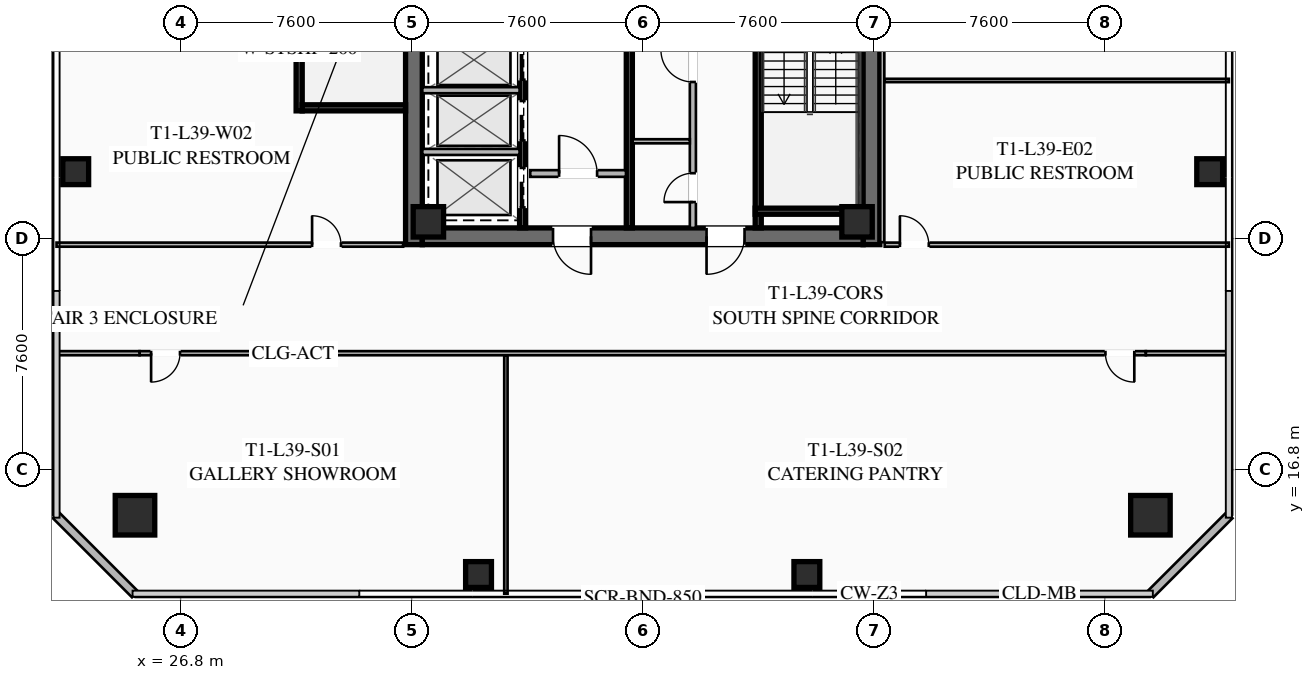
"""IFC4 building model, lengths in metres.
Left out: names, types, materials, properties, quantities, classifications, styles, units other than length and angle.
Written with IfcOpenShell. Run it as: python <this file> out.ifc"""

import sys

from ifc_helpers import new_model, si_unit, direction, frame, frame_2d, origin, origin_2d, place, context, subcontext, project, spatial, rectangle, hollow_rectangle, extrude, element, fill, save


model = new_model("IFC4")
c1 = context("Model", 3, precision=1e-05, world=origin(), true_north=direction((0.0, 1.0)))
c2 = subcontext(c1, "Body", "Model", "MODEL_VIEW")
j1 = project(units=[si_unit("LENGTHUNIT", "METRE"), si_unit("PLANEANGLEUNIT", "RADIAN")], contexts=[c1])
p1 = place(None, origin())
s1 = spatial("IfcSite", under=j1, at=p1, CompositionType="ELEMENT")
p2 = place(p1, origin())
s2 = spatial("IfcBuilding", under=s1, at=p2, CompositionType="ELEMENT")
p3 = place(p2, frame((0.0, 0.0, 146.35)))
s3 = spatial("IfcBuildingStorey", under=s2, at=p3, CompositionType="ELEMENT", Elevation=146.35)
for number, where, z_axis, x_axis in (
    (1, (34.475, 24.2, 0.0), (0.0, 0.0, 1.0), (0.0, 1.0, 0.0)),
    (2, (49.525, 39.8, 0.0), (0.0, 0.0, 1.0), (0.0, -1.0, 0.0)),
):
    element("IfcWall", number, at=place(p3, frame(where, z_axis=z_axis, x_axis=x_axis)), inside=s3, PredefinedType="SHEAR", context=c2, shape_type="SweptSolid", body=[
        extrude(rectangle(XDim=15.6, YDim=0.55, at=frame_2d((7.8, 0.0))), origin(), (0.0, 0.0, 1.0), 3.55),
    ])
p4 = place(p3, frame((49.25, 24.475, 0.0), z_axis=(0.0, 0.0, 1.0), x_axis=(-1.0, 0.0, 0.0)))
e3 = element("IfcWall", 3, at=p4, inside=s3, PredefinedType="SHEAR", context=c2, shape_type="SweptSolid", body=[
    extrude(rectangle(XDim=14.5, YDim=0.55, at=frame_2d((7.25, 0.0))), origin(), (0.0, 0.0, 1.0), 3.55),
])
p5 = place(p4, frame((8.95, 0.0, 0.0)))
e4 = element("IfcOpeningElement", 4, at=p5, cuts=e3, PredefinedType="OPENING", context=c2, shape_type="SweptSolid", body=[
    extrude(rectangle(XDim=1.25, YDim=2.25, at=frame_2d((0.625, 1.125))), frame((0.0, 0.285, 0.0), z_axis=(0.0, -1.0, 0.0), x_axis=(1.0, 0.0, 0.0)), (0.0, 0.0, 1.0), 0.57),
])
p6 = place(p4, frame((3.9, 0.0, 0.0)))
e5 = element("IfcOpeningElement", 5, at=p6, cuts=e3, PredefinedType="OPENING", context=c2, shape_type="SweptSolid", body=[
    extrude(rectangle(XDim=1.25, YDim=2.25, at=frame_2d((0.625, 1.125))), frame((0.0, 0.285, 0.0), z_axis=(0.0, -1.0, 0.0), x_axis=(1.0, 0.0, 0.0)), (0.0, 0.0, 1.0), 0.57),
])
for number, where, z_axis, x_axis in (
    (6, (34.95, 24.95, 0.0), (0.0, 0.0, 1.0), (1.0, 0.0, 0.0)),
    (7, (49.05, 24.95, 0.0), (0.0, 0.0, 1.0), (1.0, 0.0, 0.0)),
):
    element("IfcColumn", number, at=place(p3, frame(where, z_axis=z_axis, x_axis=x_axis)), inside=s3, PredefinedType="COLUMN", context=c2, shape_type="SweptSolid", body=[
        extrude(hollow_rectangle(XDim=1.0, YDim=1.0, WallThickness=0.04, at=origin_2d()), origin(), (0.0, 0.0, 1.0), 3.37),
    ])
for number, where, z_axis, x_axis in (
    (8, (25.3, 15.3, 0.0), (0.0, 0.0, 1.0), (1.0, 0.0, 0.0)),
    (9, (58.7, 15.3, 0.0), (0.0, 0.0, 1.0), (1.0, 0.0, 0.0)),
):
    element("IfcColumn", number, at=place(p3, frame(where, z_axis=z_axis, x_axis=x_axis)), inside=s3, PredefinedType="COLUMN", context=c2, shape_type="SweptSolid", body=[
        extrude(hollow_rectangle(XDim=1.3, YDim=1.3, WallThickness=0.05, at=origin_2d()), origin(), (0.0, 0.0, 1.0), 3.37),
    ])
for number, where, z_axis, x_axis in (
    (10, (36.6, 13.35, 0.0), (0.0, 0.0, 1.0), (1.0, 0.0, 0.0)),
    (11, (47.4, 13.35, 0.0), (0.0, 0.0, 1.0), (1.0, 0.0, 0.0)),
    (12, (60.65, 26.6, 0.0), (0.0, 0.0, 1.0), (1.0, 0.0, 0.0)),
    (13, (23.35, 26.6, 0.0), (0.0, 0.0, 1.0), (1.0, 0.0, 0.0)),
):
    element("IfcColumn", number, at=place(p3, frame(where, z_axis=z_axis, x_axis=x_axis)), inside=s3, PredefinedType="COLUMN", context=c2, shape_type="SweptSolid", body=[
        extrude(hollow_rectangle(XDim=0.85, YDim=0.85, WallThickness=0.035, at=origin_2d()), origin(), (0.0, 0.0, 1.0), 3.37),
    ])
for number, where, z_axis, x_axis in (
    (14, (25.3, 12.7, 0.0), (0.0, 0.0, 1.0), (-0.707, 0.707, 0.0)),
    (15, (61.3, 15.3, 0.0), (0.0, 0.0, 1.0), (-0.707, -0.707, 0.0)),
):
    element("IfcWall", number, at=place(p3, frame(where, z_axis=z_axis, x_axis=x_axis)), inside=s3, PredefinedType="SOLIDWALL", context=c2, shape_type="SweptSolid", body=[
        extrude(rectangle(XDim=3.677, YDim=0.28, at=frame_2d((1.838, 0.0))), origin(), (0.0, 0.0, 1.0), 3.37),
    ])
p7 = place(p3, frame((45.8, 32.8, 0.0), z_axis=(0.0, 0.0, 1.0), x_axis=(0.0, -1.0, 0.0)))
e16 = element("IfcWall", 16, at=p7, inside=s3, PredefinedType="SHEAR", context=c2, shape_type="SweptSolid", body=[
    extrude(rectangle(XDim=8.05, YDim=0.2, at=frame_2d((4.025, 0.0))), origin(), (0.0, 0.0, 1.0), 3.37),
])
p8 = place(p7, frame((0.45, 0.0, 0.0)))
e17 = element("IfcOpeningElement", 17, at=p8, cuts=e16, PredefinedType="OPENING", context=c2, shape_type="SweptSolid", body=[
    extrude(rectangle(XDim=1.15, YDim=2.2, at=frame_2d((0.575, 1.1))), frame((0.0, 0.11, 0.0), z_axis=(0.0, -1.0, 0.0), x_axis=(1.0, 0.0, 0.0)), (0.0, 0.0, 1.0), 0.22),
])
p9 = place(p3, frame((45.7, 25.3, 0.0), z_axis=(0.0, 0.0, 1.0), x_axis=(1.0, 0.0, 0.0)))
e18 = element("IfcWall", 18, at=p9, inside=s3, PredefinedType="SHEAR", context=c2, shape_type="SweptSolid", body=[
    extrude(rectangle(XDim=3.55, YDim=0.2, at=frame_2d((1.775, 0.0))), origin(), (0.0, 0.0, 1.0), 3.37),
])
p10 = place(p3, frame((41.56, 24.75, 0.0), z_axis=(0.0, 0.0, 1.0), x_axis=(0.0, 1.0, 0.0)))
e19 = element("IfcWall", 19, at=p10, inside=s3, PredefinedType="SHEAR", context=c2, shape_type="SweptSolid", body=[
    extrude(rectangle(XDim=14.5, YDim=0.2, at=frame_2d((7.25, 0.0))), origin(), (0.0, 0.0, 1.0), 3.37),
])
p11 = place(p3, frame((38.3, 26.54, 0.0), z_axis=(0.0, 0.0, 1.0), x_axis=(1.0, 0.0, 0.0)))
e20 = element("IfcWall", 20, at=p11, inside=s3, PredefinedType="SOLIDWALL", context=c2, shape_type="SweptSolid", body=[
    extrude(rectangle(XDim=3.15, YDim=0.22, at=frame_2d((1.575, 0.0))), origin(), (0.0, 0.0, 1.0), 2.723),
])
p12 = place(p11, frame((0.95, 0.0, 0.0)))
e21 = element("IfcOpeningElement", 21, at=p12, cuts=e20, PredefinedType="OPENING", context=c2, shape_type="SweptSolid", body=[
    extrude(rectangle(XDim=1.25, YDim=2.25, at=frame_2d((0.625, 1.125))), frame((0.0, 0.12, 0.0), z_axis=(0.0, -1.0, 0.0), x_axis=(1.0, 0.0, 0.0)), (0.0, 0.0, 1.0), 0.24),
])
p13 = place(p3, frame((38.05, 24.75, 0.0), z_axis=(0.0, 0.0, 1.0), x_axis=(0.0, 1.0, 0.0)))
e22 = element("IfcWall", 22, at=p13, inside=s3, PredefinedType="SHEAR", context=c2, shape_type="SweptSolid", body=[
    extrude(rectangle(XDim=6.45, YDim=0.2, at=frame_2d((3.225, 0.0))), origin(), (0.0, 0.0, 1.0), 3.37),
])
p14 = place(p13, frame((4.875, 0.0, 0.0)))
e23 = element("IfcOpeningElement", 23, at=p14, cuts=e22, PredefinedType="OPENING", context=c2, shape_type="SweptSolid", body=[
    extrude(rectangle(XDim=1.3, YDim=2.25, at=frame_2d((0.65, 1.125))), frame((0.0, 0.11, 0.0), z_axis=(0.0, -1.0, 0.0), x_axis=(1.0, 0.0, 0.0)), (0.0, 0.0, 1.0), 0.22),
])
p15 = place(p13, frame((2.875, 0.0, 0.0)))
e24 = element("IfcOpeningElement", 24, at=p15, cuts=e22, PredefinedType="OPENING", context=c2, shape_type="SweptSolid", body=[
    extrude(rectangle(XDim=1.3, YDim=2.25, at=frame_2d((0.65, 1.125))), frame((0.0, 0.11, 0.0), z_axis=(0.0, -1.0, 0.0), x_axis=(1.0, 0.0, 0.0)), (0.0, 0.0, 1.0), 0.22),
])
p16 = place(p13, frame((0.675, 0.0, 0.0)))
e25 = element("IfcOpeningElement", 25, at=p16, cuts=e22, PredefinedType="OPENING", context=c2, shape_type="SweptSolid", body=[
    extrude(rectangle(XDim=1.3, YDim=2.25, at=frame_2d((0.65, 1.125))), frame((0.0, 0.11, 0.0), z_axis=(0.0, -1.0, 0.0), x_axis=(1.0, 0.0, 0.0)), (0.0, 0.0, 1.0), 0.22),
])
for number, where, z_axis, x_axis in (
    (26, (34.75, 27.25, 0.0), (0.0, 0.0, 1.0), (1.0, 0.0, 0.0)),
    (27, (34.75, 29.28, 0.0), (0.0, 0.0, 1.0), (1.0, 0.0, 0.0)),
):
    element("IfcWall", number, at=place(p3, frame(where, z_axis=z_axis, x_axis=x_axis)), inside=s3, PredefinedType="SOLIDWALL", context=c2, shape_type="SweptSolid", body=[
        extrude(rectangle(XDim=3.2, YDim=0.2, at=frame_2d((1.6, 0.0))), origin(), (0.0, 0.0, 1.0), 3.37),
    ])
p17 = place(p3, frame((43.65, 24.75, 0.0), z_axis=(0.0, 0.0, 1.0), x_axis=(0.0, 1.0, 0.0)))
e28 = element("IfcWall", 28, at=p17, inside=s3, PredefinedType="SOLIDWALL", context=c2, shape_type="SweptSolid", body=[
    extrude(rectangle(XDim=6.9, YDim=0.2, at=frame_2d((3.45, 0.0))), origin(), (0.0, 0.0, 1.0), 2.723),
])
p18 = place(p17, frame((0.85, 0.0, 0.0)))
e29 = element("IfcOpeningElement", 29, at=p18, cuts=e28, PredefinedType="OPENING", context=c2, shape_type="SweptSolid", body=[
    extrude(rectangle(XDim=0.95, YDim=2.05, at=frame_2d((0.475, 1.025))), frame((0.0, 0.11, 0.0), z_axis=(0.0, -1.0, 0.0), x_axis=(1.0, 0.0, 0.0)), (0.0, 0.0, 1.0), 0.22),
])
p19 = place(p17, frame((4.8, 0.0, 0.0)))
e30 = element("IfcOpeningElement", 30, at=p19, cuts=e28, PredefinedType="OPENING", context=c2, shape_type="SweptSolid", body=[
    extrude(rectangle(XDim=1.05, YDim=2.2, at=frame_2d((0.525, 1.1))), frame((0.0, 0.11, 0.0), z_axis=(0.0, -1.0, 0.0), x_axis=(1.0, 0.0, 0.0)), (0.0, 0.0, 1.0), 0.22),
])
p20 = place(p3, frame((41.67, 27.6, 0.0), z_axis=(0.0, 0.0, 1.0), x_axis=(1.0, 0.0, 0.0)))
e31 = element("IfcWall", 31, at=p20, inside=s3, PredefinedType="PARTITIONING", context=c2, shape_type="SweptSolid", body=[
    extrude(rectangle(XDim=1.88, YDim=0.135, at=frame_2d((0.94, 0.0))), origin(), (0.0, 0.0, 1.0), 2.723),
])
p21 = place(p3, frame((30.7, 28.6, 0.0), z_axis=(0.0, 0.0, 1.0), x_axis=(0.0, 1.0, 0.0)))
e32 = element("IfcWall", 32, at=p21, inside=s3, PredefinedType="SHEAR", context=c2, shape_type="SweptSolid", body=[
    extrude(rectangle(XDim=6.8, YDim=0.2, at=frame_2d((3.4, 0.0))), origin(), (0.0, 0.0, 1.0), 3.37),
])
p22 = place(p3, frame((30.8, 28.7, 0.0), z_axis=(0.0, 0.0, 1.0), x_axis=(1.0, 0.0, 0.0)))
e33 = element("IfcWall", 33, at=p22, inside=s3, PredefinedType="SHEAR", context=c2, shape_type="SweptSolid", body=[
    extrude(rectangle(XDim=3.4, YDim=0.2, at=frame_2d((1.7, 0.0))), origin(), (0.0, 0.0, 1.0), 3.37),
])
p23 = place(p3, frame((58.55, 20.63, 0.0), z_axis=(0.0, 0.0, 1.0), x_axis=(-1.0, 0.0, 0.0)))
e34 = element("IfcWall", 34, at=p23, inside=s3, PredefinedType="PARTITIONING", context=c2, shape_type="SweptSolid", body=[
    extrude(rectangle(XDim=33.1, YDim=0.135, at=frame_2d((16.55, 0.0))), origin(), (0.0, 0.0, 1.0), 2.723),
])
p24 = place(p23, frame((31.77, 0.0, 0.0)))
e35 = element("IfcOpeningElement", 35, at=p24, cuts=e34, PredefinedType="OPENING", context=c2, shape_type="SweptSolid", body=[
    extrude(rectangle(XDim=0.95, YDim=2.05, at=frame_2d((0.475, 1.025))), frame((0.0, 0.077, 0.0), z_axis=(0.0, -1.0, 0.0), x_axis=(1.0, 0.0, 0.0)), (0.0, 0.0, 1.0), 0.155),
])
p25 = place(p23, frame((0.38, 0.0, 0.0)))
e36 = element("IfcOpeningElement", 36, at=p25, cuts=e34, PredefinedType="OPENING", context=c2, shape_type="SweptSolid", body=[
    extrude(rectangle(XDim=0.95, YDim=2.05, at=frame_2d((0.475, 1.025))), frame((0.0, 0.077, 0.0), z_axis=(0.0, -1.0, 0.0), x_axis=(1.0, 0.0, 0.0)), (0.0, 0.0, 1.0), 0.155),
])
for number, where, z_axis, x_axis in (
    (37, (22.72, 20.63, 0.0), (0.0, 0.0, 1.0), (1.0, 0.0, 0.0)),
    (38, (58.55, 20.63, 0.0), (0.0, 0.0, 1.0), (1.0, 0.0, 0.0)),
):
    element("IfcWall", number, at=place(p3, frame(where, z_axis=z_axis, x_axis=x_axis)), inside=s3, PredefinedType="PARTITIONING", context=c2, shape_type="SweptSolid", body=[
        extrude(rectangle(XDim=2.73, YDim=0.135, at=frame_2d((1.365, 0.0))), origin(), (0.0, 0.0, 1.0), 2.723),
    ])
p26 = place(p3, frame((37.5, 12.72, 0.0), z_axis=(0.0, 0.0, 1.0), x_axis=(0.0, 1.0, 0.0)))
e39 = element("IfcWall", 39, at=p26, inside=s3, PredefinedType="PARTITIONING", context=c2, shape_type="SweptSolid", body=[
    extrude(rectangle(XDim=7.83, YDim=0.11, at=frame_2d((3.915, 0.0))), origin(), (0.0, 0.0, 1.0), 2.723),
])
p27 = place(p3, frame((49.88, 39.72, 0.0), z_axis=(0.0, 0.0, 1.0), x_axis=(0.0, -1.0, 0.0)))
e40 = element("IfcWall", 40, at=p27, inside=s3, PredefinedType="PARTITIONING", context=c2, shape_type="SweptSolid", body=[
    extrude(rectangle(XDim=15.44, YDim=0.135, at=frame_2d((7.72, 0.0))), origin(), (0.0, 0.0, 1.0), 2.723),
])
p28 = place(p3, frame((49.96, 24.2, 0.0), z_axis=(0.0, 0.0, 1.0), x_axis=(1.0, 0.0, 0.0)))
e41 = element("IfcWall", 41, at=p28, inside=s3, PredefinedType="PARTITIONING", context=c2, shape_type="SweptSolid", body=[
    extrude(rectangle(XDim=11.32, YDim=0.135, at=frame_2d((5.66, 0.0))), origin(), (0.0, 0.0, 1.0), 2.723),
])
p29 = place(p28, frame((0.5, 0.0, 0.0)))
e42 = element("IfcOpeningElement", 42, at=p29, cuts=e41, PredefinedType="OPENING", context=c2, shape_type="SweptSolid", body=[
    extrude(rectangle(XDim=0.95, YDim=2.05, at=frame_2d((0.475, 1.025))), frame((0.0, 0.077, 0.0), z_axis=(0.0, -1.0, 0.0), x_axis=(1.0, 0.0, 0.0)), (0.0, 0.0, 1.0), 0.155),
])
p30 = place(p3, frame((49.96, 29.6, 0.0), z_axis=(0.0, 0.0, 1.0), x_axis=(1.0, 0.0, 0.0)))
e43 = element("IfcWall", 43, at=p30, inside=s3, PredefinedType="PARTITIONING", context=c2, shape_type="SweptSolid", body=[
    extrude(rectangle(XDim=11.32, YDim=0.11, at=frame_2d((5.66, 0.0))), origin(), (0.0, 0.0, 1.0), 2.723),
])
p31 = place(p3, frame((22.72, 24.2, 0.0), z_axis=(0.0, 0.0, 1.0), x_axis=(1.0, 0.0, 0.0)))
e44 = element("IfcWall", 44, at=p31, inside=s3, PredefinedType="PARTITIONING", context=c2, shape_type="SweptSolid", body=[
    extrude(rectangle(XDim=11.4, YDim=0.135, at=frame_2d((5.7, 0.0))), origin(), (0.0, 0.0, 1.0), 2.723),
])
p32 = place(p31, frame((8.405, 0.0, 0.0)))
e45 = element("IfcOpeningElement", 45, at=p32, cuts=e44, PredefinedType="OPENING", context=c2, shape_type="SweptSolid", body=[
    extrude(rectangle(XDim=0.95, YDim=2.05, at=frame_2d((0.475, 1.025))), frame((0.0, 0.077, 0.0), z_axis=(0.0, -1.0, 0.0), x_axis=(1.0, 0.0, 0.0)), (0.0, 0.0, 1.0), 0.155),
])
p33 = place(p5, origin())
e46 = element("IfcDoor", 46, at=p33, inside=s3, OperationType="SINGLE_SWING_LEFT", PredefinedType="DOOR", context=c2, shape_type="SweptSolid", body=[
    extrude(rectangle(XDim=1.25, YDim=2.25, at=frame_2d((0.625, 1.125))), frame((0.0, 0.025, 0.0), z_axis=(0.0, -1.0, 0.0), x_axis=(1.0, 0.0, 0.0)), (0.0, 0.0, 1.0), 0.05),
])
fill(e4, e46)
p34 = place(p6, origin())
e47 = element("IfcDoor", 47, at=p34, inside=s3, OperationType="SINGLE_SWING_RIGHT", PredefinedType="DOOR", context=c2, shape_type="SweptSolid", body=[
    extrude(rectangle(XDim=1.25, YDim=2.25, at=frame_2d((0.625, 1.125))), frame((0.0, 0.025, 0.0), z_axis=(0.0, -1.0, 0.0), x_axis=(1.0, 0.0, 0.0)), (0.0, 0.0, 1.0), 0.05),
])
fill(e5, e47)
p35 = place(p12, origin())
e48 = element("IfcDoor", 48, at=p35, inside=s3, OperationType="SINGLE_SWING_LEFT", PredefinedType="DOOR", context=c2, shape_type="SweptSolid", body=[
    extrude(rectangle(XDim=1.25, YDim=2.25, at=frame_2d((0.625, 1.125))), frame((0.0, 0.025, 0.0), z_axis=(0.0, -1.0, 0.0), x_axis=(1.0, 0.0, 0.0)), (0.0, 0.0, 1.0), 0.05),
])
fill(e21, e48)
p36 = place(p18, origin())
e49 = element("IfcDoor", 49, at=p36, inside=s3, OperationType="SINGLE_SWING_LEFT", PredefinedType="DOOR", context=c2, shape_type="SweptSolid", body=[
    extrude(rectangle(XDim=0.95, YDim=2.05, at=frame_2d((0.475, 1.025))), frame((0.0, 0.025, 0.0), z_axis=(0.0, -1.0, 0.0), x_axis=(1.0, 0.0, 0.0)), (0.0, 0.0, 1.0), 0.05),
])
fill(e29, e49)
p37 = place(p19, origin())
e50 = element("IfcDoor", 50, at=p37, inside=s3, OperationType="SINGLE_SWING_RIGHT", PredefinedType="DOOR", context=c2, shape_type="SweptSolid", body=[
    extrude(rectangle(XDim=1.05, YDim=2.2, at=frame_2d((0.525, 1.1))), frame((0.0, 0.025, 0.0), z_axis=(0.0, -1.0, 0.0), x_axis=(1.0, 0.0, 0.0)), (0.0, 0.0, 1.0), 0.05),
])
fill(e30, e50)
p38 = place(p24, origin())
e51 = element("IfcDoor", 51, at=p38, inside=s3, OperationType="SINGLE_SWING_RIGHT", PredefinedType="DOOR", context=c2, shape_type="SweptSolid", body=[
    extrude(rectangle(XDim=0.95, YDim=2.05, at=frame_2d((0.475, 1.025))), frame((0.0, 0.025, 0.0), z_axis=(0.0, -1.0, 0.0), x_axis=(1.0, 0.0, 0.0)), (0.0, 0.0, 1.0), 0.05),
])
fill(e35, e51)
p39 = place(p25, origin())
e52 = element("IfcDoor", 52, at=p39, inside=s3, OperationType="SINGLE_SWING_LEFT", PredefinedType="DOOR", context=c2, shape_type="SweptSolid", body=[
    extrude(rectangle(XDim=0.95, YDim=2.05, at=frame_2d((0.475, 1.025))), frame((0.0, 0.025, 0.0), z_axis=(0.0, -1.0, 0.0), x_axis=(1.0, 0.0, 0.0)), (0.0, 0.0, 1.0), 0.05),
])
fill(e36, e52)
p40 = place(p29, origin())
e53 = element("IfcDoor", 53, at=p40, inside=s3, OperationType="SINGLE_SWING_LEFT", PredefinedType="DOOR", context=c2, shape_type="SweptSolid", body=[
    extrude(rectangle(XDim=0.95, YDim=2.05, at=frame_2d((0.475, 1.025))), frame((0.0, 0.025, 0.0), z_axis=(0.0, -1.0, 0.0), x_axis=(1.0, 0.0, 0.0)), (0.0, 0.0, 1.0), 0.05),
])
fill(e42, e53)
p41 = place(p32, origin())
e54 = element("IfcDoor", 54, at=p41, inside=s3, OperationType="SINGLE_SWING_LEFT", PredefinedType="DOOR", context=c2, shape_type="SweptSolid", body=[
    extrude(rectangle(XDim=0.95, YDim=2.05, at=frame_2d((0.475, 1.025))), frame((0.0, 0.025, 0.0), z_axis=(0.0, -1.0, 0.0), x_axis=(1.0, 0.0, 0.0)), (0.0, 0.0, 1.0), 0.05),
])
fill(e45, e54)
p42 = place(p14, origin())
e55 = element("IfcDoor", 55, at=p42, inside=s3, OperationType="SLIDING_TO_LEFT", PredefinedType="DOOR", context=c2, shape_type="SweptSolid", body=[
    extrude(rectangle(XDim=1.3, YDim=2.25, at=frame_2d((0.65, 1.125))), frame((0.0, 0.025, 0.0), z_axis=(0.0, -1.0, 0.0), x_axis=(1.0, 0.0, 0.0)), (0.0, 0.0, 1.0), 0.05),
])
fill(e23, e55)
p43 = place(p15, origin())
e56 = element("IfcDoor", 56, at=p43, inside=s3, OperationType="SLIDING_TO_LEFT", PredefinedType="DOOR", context=c2, shape_type="SweptSolid", body=[
    extrude(rectangle(XDim=1.3, YDim=2.25, at=frame_2d((0.65, 1.125))), frame((0.0, 0.025, 0.0), z_axis=(0.0, -1.0, 0.0), x_axis=(1.0, 0.0, 0.0)), (0.0, 0.0, 1.0), 0.05),
])
fill(e24, e56)
p44 = place(p16, origin())
e57 = element("IfcDoor", 57, at=p44, inside=s3, OperationType="SLIDING_TO_LEFT", PredefinedType="DOOR", context=c2, shape_type="SweptSolid", body=[
    extrude(rectangle(XDim=1.3, YDim=2.25, at=frame_2d((0.65, 1.125))), frame((0.0, 0.025, 0.0), z_axis=(0.0, -1.0, 0.0), x_axis=(1.0, 0.0, 0.0)), (0.0, 0.0, 1.0), 0.05),
])
fill(e25, e57)
save(model, sys.argv[1])
